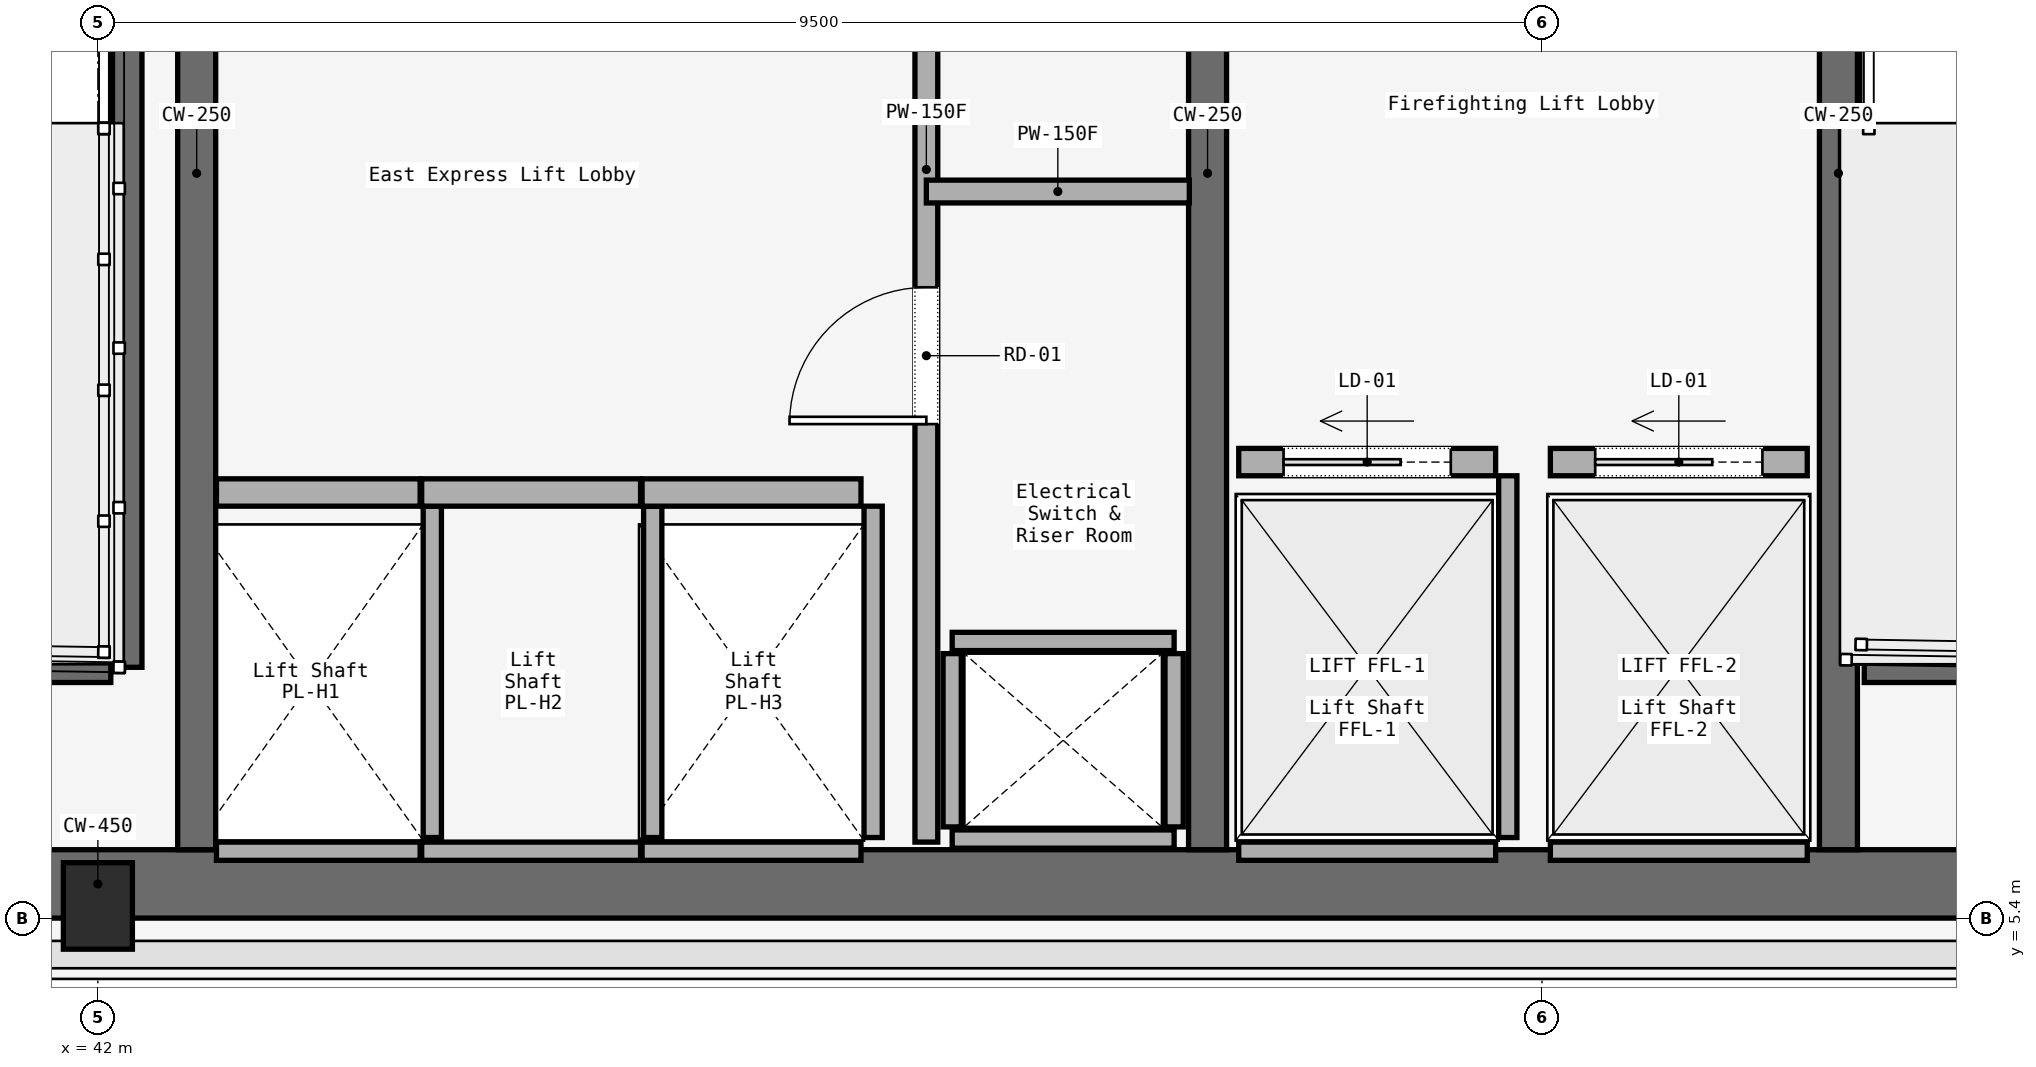
"""IFC4 building model, lengths in metres.
Left out: names, types, materials, properties, quantities, classifications, styles, units other than length and angle.
Written with IfcOpenShell. Run it as: python <this file> out.ifc"""

import sys

from ifc_helpers import new_model, si_unit, direction, frame, frame_2d, origin, origin_2d, place, context, subcontext, project, spatial, rectangle, i_section, extrude, element, fill, save


model = new_model("IFC4")
c1 = context("Model", 3, precision=1e-05, world=origin(), true_north=direction((0.0, 1.0)))
c2 = subcontext(c1, "Body", "Model", "MODEL_VIEW")
j1 = project(units=[si_unit("LENGTHUNIT", "METRE"), si_unit("PLANEANGLEUNIT", "RADIAN")], contexts=[c1])
p1 = place(None, origin())
s1 = spatial("IfcSite", under=j1, at=p1, CompositionType="ELEMENT")
p2 = place(p1, origin())
s2 = spatial("IfcBuilding", under=s1, at=p2, CompositionType="ELEMENT")
p3 = place(p2, frame((0.0, 0.0, 36.0)))
s3 = spatial("IfcBuildingStorey", under=s2, at=p3, CompositionType="ELEMENT", Elevation=36.0)
p4 = place(p3, frame((26.45, 5.625, 0.0), z_axis=(0.0, 0.0, 1.0), x_axis=(1.0, 0.0, 0.0)))
e1 = element("IfcWall", 1, at=p4, inside=s3, PredefinedType="SOLIDWALL", context=c2, shape_type="SweptSolid", body=[
    extrude(rectangle(XDim=31.1, YDim=0.45, at=frame_2d((15.55, 0.0))), origin(), (0.0, 0.0, 1.0), 3.58),
])
for number, where, z_axis, x_axis in (
    (2, (42.65, 5.85, 0.0), (0.0, 0.0, 1.0), (0.0, 1.0, 0.0)),
    (3, (49.3, 5.85, 0.0), (0.0, 0.0, 1.0), (0.0, 1.0, 0.0)),
):
    element("IfcWall", number, at=place(p3, frame(where, z_axis=z_axis, x_axis=x_axis)), inside=s3, PredefinedType="SOLIDWALL", context=c2, shape_type="SweptSolid", body=[
        extrude(rectangle(XDim=8.9, YDim=0.25, at=frame_2d((4.45, 0.0))), origin(), (0.0, 0.0, 1.0), 3.58),
    ])
p5 = place(p3, frame((53.45, 5.85, 0.0), z_axis=(0.0, 0.0, 1.0), x_axis=(0.0, 1.0, 0.0)))
e4 = element("IfcWall", 4, at=p5, inside=s3, PredefinedType="SOLIDWALL", context=c2, shape_type="SweptSolid", body=[
    extrude(rectangle(XDim=8.9, YDim=0.25, at=frame_2d((4.45, 0.0))), origin(), (0.0, 0.0, 1.0), 3.58),
])
p6 = place(p5, frame((7.45, 0.0, 0.0)))
e5 = element("IfcOpeningElement", 5, at=p6, cuts=e4, PredefinedType="OPENING", context=c2, shape_type="SweptSolid", body=[
    extrude(rectangle(XDim=1.1, YDim=2.2, at=frame_2d((0.55, 1.1))), frame((0.0, 0.125, 0.0), z_axis=(0.0, -1.0, 0.0), x_axis=(1.0, 0.0, 0.0)), (0.0, 0.0, 1.0), 0.25),
])
p7 = place(p3, frame((42.0, 5.48, 0.0), z_axis=(0.0, 0.0, 1.0), x_axis=(1.0, 0.0, 0.0)))
e6 = element("IfcColumn", 6, at=p7, inside=s3, PredefinedType="COLUMN", context=c2, shape_type="SweptSolid", body=[
    extrude(i_section(OverallWidth=0.454, OverallDepth=0.569, WebThickness=0.078, FlangeThickness=0.08, FilletRadius=0.015, at=origin_2d()), origin(), (0.0, 0.0, 1.0), 3.58),
])
p8 = place(p3, frame((42.19, 14.7, 0.0), z_axis=(0.0, 0.0, 1.0), x_axis=(0.0, -1.0, 0.0)))
e7 = element("IfcWall", 7, at=p8, inside=s3, PredefinedType="SOLIDWALL", context=c2, shape_type="SweptSolid", body=[
    extrude(rectangle(XDim=7.65, YDim=0.2, at=frame_2d((3.825, 0.0))), origin(), (0.0, 0.0, 1.0), 3.8),
])
for number, where, z_axis, x_axis in (
    (8, (38.97, 7.05, 0.0), (0.0, 0.0, 1.0), (1.0, 0.0, 0.0)),
    (9, (53.62, 7.05, 0.0), (0.0, 0.0, 1.0), (1.0, 0.0, 0.0)),
):
    element("IfcWall", number, at=place(p3, frame(where, z_axis=z_axis, x_axis=x_axis)), inside=s3, PredefinedType="SOLIDWALL", context=c2, shape_type="SweptSolid", body=[
        extrude(rectangle(XDim=3.115, YDim=0.2, at=frame_2d((1.558, 0.0))), origin(), (0.0, 0.0, 1.0), 3.8),
    ])
for number, where, z_axis, x_axis in (
    (10, (47.62, 5.92, 0.0), (0.0, 0.0, 1.0), (1.0, 0.0, 0.0)),
    (11, (47.62, 7.22, 0.0), (0.0, 0.0, 1.0), (1.0, 0.0, 0.0)),
):
    element("IfcWall", number, at=place(p3, frame(where, z_axis=z_axis, x_axis=x_axis)), inside=s3, PredefinedType="SOLIDWALL", context=c2, shape_type="SweptSolid", body=[
        extrude(rectangle(XDim=1.46, YDim=0.12, at=frame_2d((0.73, 0.0))), origin(), (0.0, 0.0, 1.0), 2.933),
    ])
for number, where, z_axis, x_axis in (
    (12, (47.62, 6.0, 0.0), (0.0, 0.0, 1.0), (0.0, 1.0, 0.0)),
    (13, (49.08, 6.0, 0.0), (0.0, 0.0, 1.0), (0.0, 1.0, 0.0)),
):
    element("IfcWall", number, at=place(p3, frame(where, z_axis=z_axis, x_axis=x_axis)), inside=s3, PredefinedType="SOLIDWALL", context=c2, shape_type="SweptSolid", body=[
        extrude(rectangle(XDim=1.14, YDim=0.12, at=frame_2d((0.57, 0.0))), origin(), (0.0, 0.0, 1.0), 2.933),
    ])
p9 = place(p3, frame((47.45, 5.9, 0.0), z_axis=(0.0, 0.0, 1.0), x_axis=(0.0, 1.0, 0.0)))
e14 = element("IfcWall", 14, at=p9, inside=s3, PredefinedType="PARTITIONING", context=c2, shape_type="SweptSolid", body=[
    extrude(rectangle(XDim=8.85, YDim=0.15, at=frame_2d((4.425, 0.0))), origin(), (0.0, 0.0, 1.0), 2.933),
])
p10 = place(p9, frame((2.75, 0.0, 0.0)))
e15 = element("IfcOpeningElement", 15, at=p10, cuts=e14, PredefinedType="OPENING", context=c2, shape_type="SweptSolid", body=[
    extrude(rectangle(XDim=0.9, YDim=2.1, at=frame_2d((0.45, 1.05))), frame((0.0, 0.075, 0.0), z_axis=(0.0, -1.0, 0.0), x_axis=(1.0, 0.0, 0.0)), (0.0, 0.0, 1.0), 0.15),
])
p11 = place(p3, frame((47.45, 10.18, 0.0), z_axis=(0.0, 0.0, 1.0), x_axis=(1.0, 0.0, 0.0)))
e16 = element("IfcWall", 16, at=p11, inside=s3, PredefinedType="PARTITIONING", context=c2, shape_type="SweptSolid", body=[
    extrude(rectangle(XDim=1.73, YDim=0.15, at=frame_2d((0.865, 0.0))), origin(), (0.0, 0.0, 1.0), 2.933),
])
p12 = place(p3, frame((42.78, 8.2, 0.0), z_axis=(0.0, 0.0, 1.0), x_axis=(1.0, 0.0, 0.0)))
e17 = element("IfcWall", 17, at=p12, inside=s3, PredefinedType="SOLIDWALL", context=c2, shape_type="SweptSolid", body=[
    extrude(rectangle(XDim=1.34, YDim=0.18, at=frame_2d((0.67, 0.0))), origin(), (0.0, 0.0, 1.0), 2.933),
])
p13 = place(p3, frame((42.78, 5.84, 0.0), z_axis=(0.0, 0.0, 1.0), x_axis=(1.0, 0.0, 0.0)))
e18 = element("IfcWall", 18, at=p13, inside=s3, PredefinedType="SOLIDWALL", context=c2, shape_type="SweptSolid", body=[
    extrude(rectangle(XDim=1.34, YDim=0.12, at=frame_2d((0.67, 0.0))), origin(), (0.0, 0.0, 1.0), 2.933),
])
p14 = place(p3, frame((44.2, 5.93, 0.0), z_axis=(0.0, 0.0, 1.0), x_axis=(0.0, 1.0, 0.0)))
e19 = element("IfcWall", 19, at=p14, inside=s3, PredefinedType="SOLIDWALL", context=c2, shape_type="SweptSolid", body=[
    extrude(rectangle(XDim=2.18, YDim=0.12, at=frame_2d((1.09, 0.0))), origin(), (0.0, 0.0, 1.0), 2.933),
])
p15 = place(p3, frame((44.13, 8.2, 0.0), z_axis=(0.0, 0.0, 1.0), x_axis=(1.0, 0.0, 0.0)))
e20 = element("IfcWall", 20, at=p15, inside=s3, PredefinedType="SOLIDWALL", context=c2, shape_type="SweptSolid", body=[
    extrude(rectangle(XDim=1.44, YDim=0.18, at=frame_2d((0.72, 0.0))), origin(), (0.0, 0.0, 1.0), 2.933),
])
p16 = place(p3, frame((44.13, 5.84, 0.0), z_axis=(0.0, 0.0, 1.0), x_axis=(1.0, 0.0, 0.0)))
e21 = element("IfcWall", 21, at=p16, inside=s3, PredefinedType="SOLIDWALL", context=c2, shape_type="SweptSolid", body=[
    extrude(rectangle(XDim=1.44, YDim=0.12, at=frame_2d((0.72, 0.0))), origin(), (0.0, 0.0, 1.0), 2.933),
])
p17 = place(p3, frame((45.65, 5.93, 0.0), z_axis=(0.0, 0.0, 1.0), x_axis=(0.0, 1.0, 0.0)))
e22 = element("IfcWall", 22, at=p17, inside=s3, PredefinedType="SOLIDWALL", context=c2, shape_type="SweptSolid", body=[
    extrude(rectangle(XDim=2.18, YDim=0.12, at=frame_2d((1.09, 0.0))), origin(), (0.0, 0.0, 1.0), 2.933),
])
p18 = place(p3, frame((45.58, 8.2, 0.0), z_axis=(0.0, 0.0, 1.0), x_axis=(1.0, 0.0, 0.0)))
e23 = element("IfcWall", 23, at=p18, inside=s3, PredefinedType="SOLIDWALL", context=c2, shape_type="SweptSolid", body=[
    extrude(rectangle(XDim=1.44, YDim=0.18, at=frame_2d((0.72, 0.0))), origin(), (0.0, 0.0, 1.0), 2.933),
])
p19 = place(p3, frame((45.58, 5.84, 0.0), z_axis=(0.0, 0.0, 1.0), x_axis=(1.0, 0.0, 0.0)))
e24 = element("IfcWall", 24, at=p19, inside=s3, PredefinedType="SOLIDWALL", context=c2, shape_type="SweptSolid", body=[
    extrude(rectangle(XDim=1.44, YDim=0.12, at=frame_2d((0.72, 0.0))), origin(), (0.0, 0.0, 1.0), 2.933),
])
p20 = place(p3, frame((47.1, 5.93, 0.0), z_axis=(0.0, 0.0, 1.0), x_axis=(0.0, 1.0, 0.0)))
e25 = element("IfcWall", 25, at=p20, inside=s3, PredefinedType="SOLIDWALL", context=c2, shape_type="SweptSolid", body=[
    extrude(rectangle(XDim=2.18, YDim=0.12, at=frame_2d((1.09, 0.0))), origin(), (0.0, 0.0, 1.0), 2.933),
])
p21 = place(p3, frame((49.505, 8.4, 0.0), z_axis=(0.0, 0.0, 1.0), x_axis=(1.0, 0.0, 0.0)))
e26 = element("IfcWall", 26, at=p21, inside=s3, PredefinedType="SOLIDWALL", context=c2, shape_type="SweptSolid", body=[
    extrude(rectangle(XDim=1.69, YDim=0.18, at=frame_2d((0.845, 0.0))), origin(), (0.0, 0.0, 1.0), 2.933),
])
p22 = place(p21, frame((0.295, 0.0, 0.0)))
e27 = element("IfcOpeningElement", 27, at=p22, cuts=e26, PredefinedType="OPENING", context=c2, shape_type="SweptSolid", body=[
    extrude(rectangle(XDim=1.1, YDim=2.2, at=frame_2d((0.55, 1.1))), frame((0.0, 0.09, 0.0), z_axis=(0.0, -1.0, 0.0), x_axis=(1.0, 0.0, 0.0)), (0.0, 0.0, 1.0), 0.18),
])
p23 = place(p3, frame((49.505, 5.84, 0.0), z_axis=(0.0, 0.0, 1.0), x_axis=(1.0, 0.0, 0.0)))
e28 = element("IfcWall", 28, at=p23, inside=s3, PredefinedType="SOLIDWALL", context=c2, shape_type="SweptSolid", body=[
    extrude(rectangle(XDim=1.69, YDim=0.12, at=frame_2d((0.845, 0.0))), origin(), (0.0, 0.0, 1.0), 2.933),
])
p24 = place(p3, frame((51.275, 5.93, 0.0), z_axis=(0.0, 0.0, 1.0), x_axis=(0.0, 1.0, 0.0)))
e29 = element("IfcWall", 29, at=p24, inside=s3, PredefinedType="SOLIDWALL", context=c2, shape_type="SweptSolid", body=[
    extrude(rectangle(XDim=2.38, YDim=0.12, at=frame_2d((1.19, 0.0))), origin(), (0.0, 0.0, 1.0), 2.933),
])
p25 = place(p3, frame((51.555, 8.4, 0.0), z_axis=(0.0, 0.0, 1.0), x_axis=(1.0, 0.0, 0.0)))
e30 = element("IfcWall", 30, at=p25, inside=s3, PredefinedType="SOLIDWALL", context=c2, shape_type="SweptSolid", body=[
    extrude(rectangle(XDim=1.69, YDim=0.18, at=frame_2d((0.845, 0.0))), origin(), (0.0, 0.0, 1.0), 2.933),
])
p26 = place(p25, frame((0.295, 0.0, 0.0)))
e31 = element("IfcOpeningElement", 31, at=p26, cuts=e30, PredefinedType="OPENING", context=c2, shape_type="SweptSolid", body=[
    extrude(rectangle(XDim=1.1, YDim=2.2, at=frame_2d((0.55, 1.1))), frame((0.0, 0.09, 0.0), z_axis=(0.0, -1.0, 0.0), x_axis=(1.0, 0.0, 0.0)), (0.0, 0.0, 1.0), 0.18),
])
p27 = place(p3, frame((51.555, 5.84, 0.0), z_axis=(0.0, 0.0, 1.0), x_axis=(1.0, 0.0, 0.0)))
e32 = element("IfcWall", 32, at=p27, inside=s3, PredefinedType="SOLIDWALL", context=c2, shape_type="SweptSolid", body=[
    extrude(rectangle(XDim=1.69, YDim=0.12, at=frame_2d((0.845, 0.0))), origin(), (0.0, 0.0, 1.0), 2.933),
])
p28 = place(p10, origin())
e33 = element("IfcDoor", 33, at=p28, inside=s3, OperationType="SINGLE_SWING_RIGHT", PredefinedType="DOOR", context=c2, shape_type="SweptSolid", body=[
    extrude(rectangle(XDim=0.9, YDim=2.1, at=frame_2d((0.45, 1.05))), frame((0.0, 0.025, 0.0), z_axis=(0.0, -1.0, 0.0), x_axis=(1.0, 0.0, 0.0)), (0.0, 0.0, 1.0), 0.05),
])
fill(e15, e33)
p29 = place(p22, origin())
e34 = element("IfcDoor", 34, at=p29, inside=s3, OperationType="SLIDING_TO_LEFT", PredefinedType="DOOR", context=c2, shape_type="SweptSolid", body=[
    extrude(rectangle(XDim=1.1, YDim=2.2, at=frame_2d((0.55, 1.1))), frame((0.0, 0.025, 0.0), z_axis=(0.0, -1.0, 0.0), x_axis=(1.0, 0.0, 0.0)), (0.0, 0.0, 1.0), 0.05),
])
fill(e27, e34)
p30 = place(p26, origin())
e35 = element("IfcDoor", 35, at=p30, inside=s3, OperationType="SLIDING_TO_LEFT", PredefinedType="DOOR", context=c2, shape_type="SweptSolid", body=[
    extrude(rectangle(XDim=1.1, YDim=2.2, at=frame_2d((0.55, 1.1))), frame((0.0, 0.025, 0.0), z_axis=(0.0, -1.0, 0.0), x_axis=(1.0, 0.0, 0.0)), (0.0, 0.0, 1.0), 0.05),
])
fill(e31, e35)
save(model, sys.argv[1])
